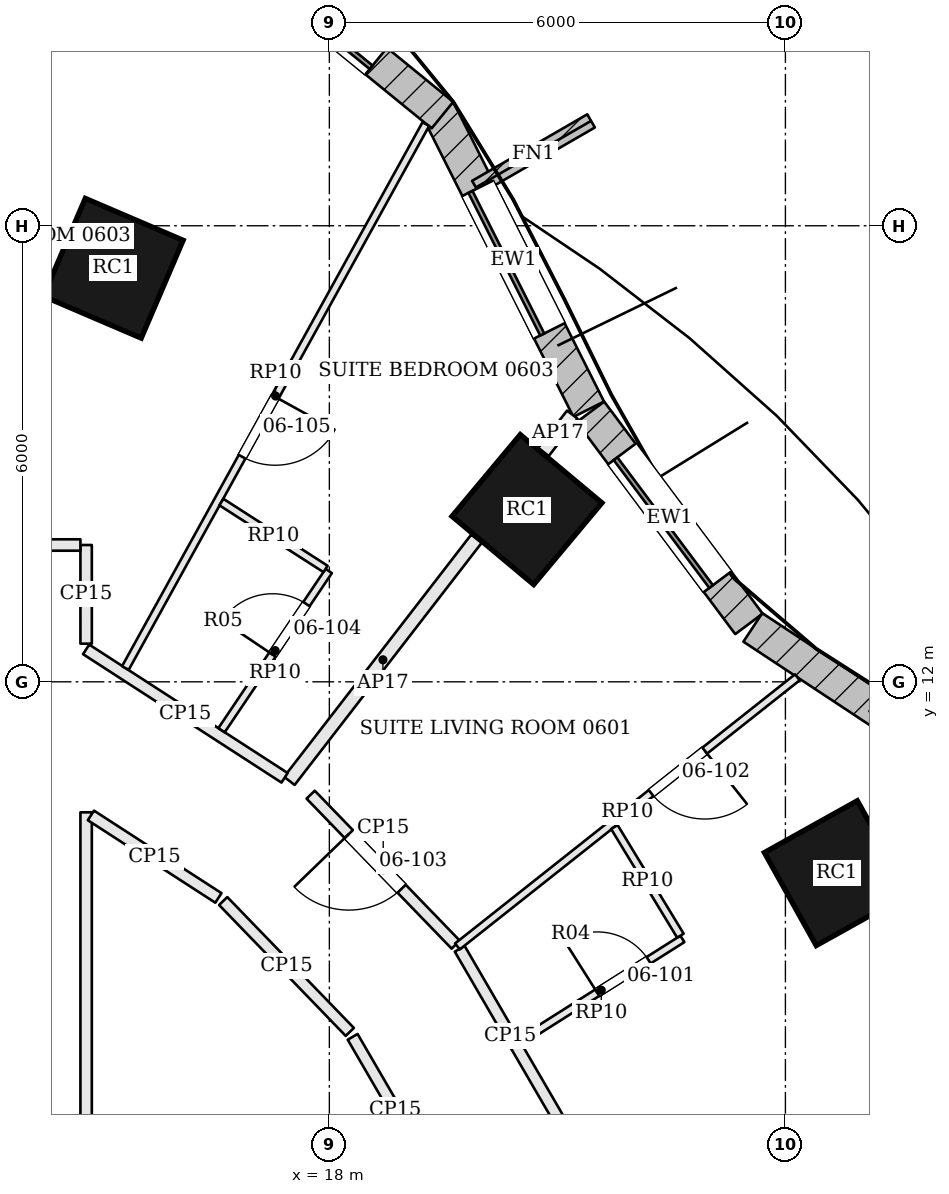
"""IFC4 building model, lengths in metres.
Left out: names, types, materials, properties, quantities, classifications, styles, units other than length and angle.
Written with IfcOpenShell. Run it as: python <this file> out.ifc"""

import sys

from ifc_helpers import new_model, si_unit, direction, frame, frame_2d, origin, origin_2d, place, context, subcontext, project, spatial, rectangle, extrude, element, fill, save


model = new_model("IFC4")
c1 = context("Model", 3, precision=1e-05, world=origin(), true_north=direction((0.0, 1.0)))
c2 = subcontext(c1, "Body", "Model", "MODEL_VIEW")
j1 = project(units=[si_unit("LENGTHUNIT", "METRE"), si_unit("PLANEANGLEUNIT", "RADIAN")], contexts=[c1])
p1 = place(None, origin())
s1 = spatial("IfcSite", under=j1, at=p1, CompositionType="ELEMENT")
p2 = place(p1, origin())
s2 = spatial("IfcBuilding", under=s1, at=p2, CompositionType="ELEMENT")
p3 = place(p2, frame((0.0, 0.0, 37.5)))
s3 = spatial("IfcBuildingStorey", under=s2, at=p3, CompositionType="ELEMENT", Elevation=37.5)
for number, where, z_axis, x_axis in (
    (1, (24.676, 9.483, 0.0), (0.0, 0.0, 1.0), (-0.487, 0.873, 0.0)),
    (2, (20.6, 14.266, 0.0), (0.0, 0.0, 1.0), (-0.767, 0.641, 0.0)),
    (3, (15.157, 17.441, 0.0), (0.0, 0.0, 1.0), (-0.919, 0.394, 0.0)),
):
    element("IfcColumn", number, at=place(p3, frame(where, z_axis=z_axis, x_axis=x_axis)), inside=s3, PredefinedType="COLUMN", context=c2, shape_type="SweptSolid", body=[
        extrude(rectangle(XDim=1.4, YDim=1.4, at=origin_2d()), origin(), (0.0, 0.0, 1.0), 3.6),
    ])
p4 = place(p3, frame((28.853, 9.227, 0.0), z_axis=(0.0, 0.0, 1.0), x_axis=(-0.834404370393, 0.551152743502, 0.0)))
e4 = element("IfcWall", 4, at=p4, inside=s3, PredefinedType="SOLIDWALL", context=c2, shape_type="SweptSolid", body=[
    extrude(rectangle(XDim=6.33, YDim=0.45, at=frame_2d((3.165, 0.0))), origin(), (0.0, 0.0, 1.0), 3.4),
])
p5 = place(p4, frame((2.265, 0.0, 0.9)))
e5 = element("IfcOpeningElement", 5, at=p5, cuts=e4, PredefinedType="OPENING", context=c2, shape_type="SweptSolid", body=[
    extrude(rectangle(XDim=1.8, YDim=2.0, at=frame_2d((0.9, 1.0))), frame((0.0, 0.235, 0.0), z_axis=(0.0, -1.0, 0.0), x_axis=(1.0, 0.0, 0.0)), (0.0, 0.0, 1.0), 0.47),
])
p6 = place(p3, frame((23.52, 12.762, 0.0), z_axis=(0.0, 0.0, 1.0), x_axis=(-0.598664281495, 0.801000048728, 0.0)))
e6 = element("IfcWall", 6, at=p6, inside=s3, PredefinedType="SOLIDWALL", context=c2, shape_type="SweptSolid", body=[
    extrude(rectangle(XDim=3.482, YDim=0.45, at=frame_2d((1.741, 0.0))), origin(), (0.0, 0.0, 1.0), 3.4),
])
p7 = place(p6, frame((0.691, 0.0, 0.9)))
e7 = element("IfcOpeningElement", 7, at=p7, cuts=e6, PredefinedType="OPENING", context=c2, shape_type="SweptSolid", body=[
    extrude(rectangle(XDim=2.1, YDim=2.0, at=frame_2d((1.05, 1.0))), frame((0.0, 0.235, 0.0), z_axis=(0.0, -1.0, 0.0), x_axis=(1.0, 0.0, 0.0)), (0.0, 0.0, 1.0), 0.47),
])
p8 = place(p3, frame((21.413, 15.586, 0.0), z_axis=(0.0, 0.0, 1.0), x_axis=(-0.449428064685, 0.893316525467, 0.0)))
e8 = element("IfcWall", 8, at=p8, inside=s3, PredefinedType="SOLIDWALL", context=c2, shape_type="SweptSolid", body=[
    extrude(rectangle(XDim=4.407, YDim=0.45, at=frame_2d((2.204, 0.0))), origin(), (0.0, 0.0, 1.0), 3.4),
])
p9 = place(p8, frame((1.154, 0.0, 0.9)))
e9 = element("IfcOpeningElement", 9, at=p9, cuts=e8, PredefinedType="OPENING", context=c2, shape_type="SweptSolid", body=[
    extrude(rectangle(XDim=2.1, YDim=2.0, at=frame_2d((1.05, 1.0))), frame((0.0, 0.235, 0.0), z_axis=(0.0, -1.0, 0.0), x_axis=(1.0, 0.0, 0.0)), (0.0, 0.0, 1.0), 0.47),
])
p10 = place(p3, frame((19.488, 19.456, 0.0), z_axis=(0.0, 0.0, 1.0), x_axis=(-0.775096506427, 0.631842864741, 0.0)))
e10 = element("IfcWall", 10, at=p10, inside=s3, PredefinedType="SOLIDWALL", context=c2, shape_type="SweptSolid", body=[
    extrude(rectangle(XDim=4.349, YDim=0.45, at=frame_2d((2.175, 0.0))), origin(), (0.0, 0.0, 1.0), 3.4),
])
p11 = place(p10, frame((1.125, 0.0, 0.9)))
e11 = element("IfcOpeningElement", 11, at=p11, cuts=e10, PredefinedType="OPENING", context=c2, shape_type="SweptSolid", body=[
    extrude(rectangle(XDim=2.1, YDim=2.0, at=frame_2d((1.05, 1.0))), frame((0.0, 0.235, 0.0), z_axis=(0.0, -1.0, 0.0), x_axis=(1.0, 0.0, 0.0)), (0.0, 0.0, 1.0), 0.47),
])
p12 = place(p3, frame((19.928, 18.504, 0.0), z_axis=(0.0, 0.0, 1.0), x_axis=(0.865881186914, 0.500249707794, 0.0)))
e12 = element("IfcWall", 12, at=p12, inside=s3, PredefinedType="SOLIDWALL", context=c2, shape_type="SweptSolid", body=[
    extrude(rectangle(XDim=1.75, YDim=0.2, at=frame_2d((0.875, 0.0))), origin(), (0.0, 0.0, 1.0), 3.4),
])
p13 = place(p3, frame((28.807, 9.347, 3.6), z_axis=(0.0, 0.0, 1.0), x_axis=(-0.834398186729, 0.551162104995, 0.0)))
e13 = element("IfcWall", 13, at=p13, inside=s3, PredefinedType="PARAPET", context=c2, shape_type="SweptSolid", body=[
    extrude(rectangle(XDim=4.337, YDim=0.3, at=frame_2d((2.169, 0.0))), origin(), (0.0, 0.0, 1.0), 1.1),
])
p14 = place(p3, frame((21.043, 6.202, 0.0), z_axis=(0.0, 0.0, 1.0), x_axis=(-0.502371650135, 0.864651794158, 0.0)))
e14 = element("IfcWall", 14, at=p14, inside=s3, PredefinedType="PARTITIONING", context=c2, shape_type="SweptSolid", body=[
    extrude(rectangle(XDim=2.644, YDim=0.15, at=frame_2d((1.322, 0.0))), origin(), (0.0, 0.0, 1.0), 2.68),
])
p15 = place(p3, frame((19.663, 8.542, 0.0), z_axis=(0.0, 0.0, 1.0), x_axis=(-0.695225869021, 0.718791340407, 0.0)))
e15 = element("IfcWall", 15, at=p15, inside=s3, PredefinedType="PARTITIONING", context=c2, shape_type="SweptSolid", body=[
    extrude(rectangle(XDim=2.745, YDim=0.15, at=frame_2d((1.373, 0.0))), origin(), (0.0, 0.0, 1.0), 2.68),
])
p16 = place(p15, frame((1.024, 0.0, 0.0)))
e16 = element("IfcOpeningElement", 16, at=p16, cuts=e15, PredefinedType="OPENING", context=c2, shape_type="SweptSolid", body=[
    extrude(rectangle(XDim=1.0, YDim=2.1, at=frame_2d((0.5, 1.05))), frame((0.0, 0.085, 0.0), z_axis=(0.0, -1.0, 0.0), x_axis=(1.0, 0.0, 0.0)), (0.0, 0.0, 1.0), 0.17),
])
p17 = place(p3, frame((21.197, 15.515, 0.0), z_axis=(0.0, 0.0, 1.0), x_axis=(-0.61138040292, -0.791336845424, 0.0)))
e17 = element("IfcWall", 17, at=p17, inside=s3, PredefinedType="PARTITIONING", context=c2, shape_type="SweptSolid", body=[
    extrude(rectangle(XDim=0.621, YDim=0.175, at=frame_2d((0.311, 0.0))), origin(), (0.0, 0.0, 1.0), 2.68),
])
p18 = place(p3, frame((19.936, 13.883, 0.0), z_axis=(0.0, 0.0, 1.0), x_axis=(-0.611406081733, -0.791317005516, 0.0)))
e18 = element("IfcWall", 18, at=p18, inside=s3, PredefinedType="PARTITIONING", context=c2, shape_type="SweptSolid", body=[
    extrude(rectangle(XDim=4.026, YDim=0.175, at=frame_2d((2.013, 0.0))), origin(), (0.0, 0.0, 1.0), 2.68),
])
p19 = place(p3, frame((17.411, 10.738, 0.0), z_axis=(0.0, 0.0, 1.0), x_axis=(-0.839570157152, 0.543251278157, 0.0)))
e19 = element("IfcWall", 19, at=p19, inside=s3, PredefinedType="PARTITIONING", context=c2, shape_type="SweptSolid", body=[
    extrude(rectangle(XDim=3.109, YDim=0.15, at=frame_2d((1.555, 0.0))), origin(), (0.0, 0.0, 1.0), 2.68),
])
p20 = place(p3, frame((14.8, 12.502, 0.0), z_axis=(0.0, 0.0, 1.0), x_axis=(-0.000188040613, 0.99999998232, 0.0)))
e20 = element("IfcWall", 20, at=p20, inside=s3, PredefinedType="PARTITIONING", context=c2, shape_type="SweptSolid", body=[
    extrude(rectangle(XDim=1.298, YDim=0.15, at=frame_2d((0.649, 0.0))), origin(), (0.0, 0.0, 1.0), 2.68),
])
p21 = place(p3, frame((14.725, 13.8, 0.0), z_axis=(0.0, 0.0, 1.0), x_axis=(-1.0, 0.0, 0.0)))
e21 = element("IfcWall", 21, at=p21, inside=s3, PredefinedType="PARTITIONING", context=c2, shape_type="SweptSolid", body=[
    extrude(rectangle(XDim=3.336, YDim=0.15, at=frame_2d((1.668, 0.0))), origin(), (0.0, 0.0, 1.0), 2.68),
])
p22 = place(p21, frame((2.05, 0.0, 0.0)))
e22 = element("IfcOpeningElement", 22, at=p22, cuts=e21, PredefinedType="OPENING", context=c2, shape_type="SweptSolid", body=[
    extrude(rectangle(XDim=1.0, YDim=2.1, at=frame_2d((0.5, 1.05))), frame((0.0, 0.085, 0.0), z_axis=(0.0, -1.0, 0.0), x_axis=(1.0, 0.0, 0.0)), (0.0, 0.0, 1.0), 0.17),
])
p23 = place(p3, frame((16.604, 9.116, 0.0), z_axis=(0.0, 0.0, 1.0), x_axis=(0.695185405932, -0.718830474716, 0.0)))
e23 = element("IfcWall", 23, at=p23, inside=s3, PredefinedType="PARTITIONING", context=c2, shape_type="SweptSolid", body=[
    extrude(rectangle(XDim=2.396, YDim=0.15, at=frame_2d((1.198, 0.0))), origin(), (0.0, 0.0, 1.0), 2.68),
])
p24 = place(p3, frame((18.306, 7.329, 0.0), z_axis=(0.0, 0.0, 1.0), x_axis=(0.502425081691, -0.864620747662, 0.0)))
e24 = element("IfcWall", 24, at=p24, inside=s3, PredefinedType="PARTITIONING", context=c2, shape_type="SweptSolid", body=[
    extrude(rectangle(XDim=2.237, YDim=0.15, at=frame_2d((1.119, 0.0))), origin(), (0.0, 0.0, 1.0), 2.68),
])
p25 = place(p3, frame((14.8, -4.725, 0.0), z_axis=(0.0, 0.0, 1.0), x_axis=(0.0, 1.0, 0.0)))
e25 = element("IfcWall", 25, at=p25, inside=s3, PredefinedType="PARTITIONING", context=c2, shape_type="SweptSolid", body=[
    extrude(rectangle(XDim=15.008, YDim=0.15, at=frame_2d((7.504, 0.0))), origin(), (0.0, 0.0, 1.0), 2.68),
])
p26 = place(p25, frame((6.566, 0.0, 0.0)))
e26 = element("IfcOpeningElement", 26, at=p26, cuts=e25, PredefinedType="OPENING", context=c2, shape_type="SweptSolid", body=[
    extrude(rectangle(XDim=1.8, YDim=2.1, at=frame_2d((0.9, 1.05))), frame((0.0, 0.085, 0.0), z_axis=(0.0, -1.0, 0.0), x_axis=(1.0, 0.0, 0.0)), (0.0, 0.0, 1.0), 0.17),
])
p27 = place(p3, frame((14.863, 10.242, 0.0), z_axis=(0.0, 0.0, 1.0), x_axis=(0.839530811724, -0.543312079901, 0.0)))
e27 = element("IfcWall", 27, at=p27, inside=s3, PredefinedType="PARTITIONING", context=c2, shape_type="SweptSolid", body=[
    extrude(rectangle(XDim=1.998, YDim=0.15, at=frame_2d((0.999, 0.0))), origin(), (0.0, 0.0, 1.0), 2.68),
])
p28 = place(p3, frame((24.157, 12.06, 0.0), z_axis=(0.0, 0.0, 1.0), x_axis=(-0.784024125513, -0.620730352579, 0.0)))
e28 = element("IfcWall", 28, at=p28, inside=s3, PredefinedType="PARTITIONING", context=c2, shape_type="SweptSolid", body=[
    extrude(rectangle(XDim=5.704, YDim=0.1, at=frame_2d((2.852, 0.0))), origin(), (0.0, 0.0, 1.0), 2.884),
])
p29 = place(p28, frame((1.554, 0.0, 0.0)))
e29 = element("IfcOpeningElement", 29, at=p29, cuts=e28, PredefinedType="OPENING", context=c2, shape_type="SweptSolid", body=[
    extrude(rectangle(XDim=0.9, YDim=2.4, at=frame_2d((0.45, 1.2))), frame((0.0, 0.06, 0.0), z_axis=(0.0, -1.0, 0.0), x_axis=(1.0, 0.0, 0.0)), (0.0, 0.0, 1.0), 0.12),
])
p30 = place(p3, frame((20.51, 7.268, 0.0), z_axis=(0.0, 0.0, 1.0), x_axis=(0.845139460936, 0.534545874148, 0.0)))
e30 = element("IfcWall", 30, at=p30, inside=s3, PredefinedType="PARTITIONING", context=c2, shape_type="SweptSolid", body=[
    extrude(rectangle(XDim=2.525, YDim=0.1, at=frame_2d((1.262, 0.0))), origin(), (0.0, 0.0, 1.0), 2.884),
])
p31 = place(p30, frame((1.2, 0.0, 0.0)))
e31 = element("IfcOpeningElement", 31, at=p31, cuts=e30, PredefinedType="OPENING", context=c2, shape_type="SweptSolid", body=[
    extrude(rectangle(XDim=0.8, YDim=2.1, at=frame_2d((0.4, 1.05))), frame((0.0, 0.06, 0.0), z_axis=(0.0, -1.0, 0.0), x_axis=(1.0, 0.0, 0.0)), (0.0, 0.0, 1.0), 0.12),
])
p32 = place(p3, frame((22.618, 8.661, 0.0), z_axis=(0.0, 0.0, 1.0), x_axis=(-0.519423656264, 0.854516860754, 0.0)))
e32 = element("IfcWall", 32, at=p32, inside=s3, PredefinedType="PARTITIONING", context=c2, shape_type="SweptSolid", body=[
    extrude(rectangle(XDim=1.673, YDim=0.1, at=frame_2d((0.836, 0.0))), origin(), (0.0, 0.0, 1.0), 2.884),
])
p33 = place(p3, frame((19.269, 19.337, 0.0), z_axis=(0.0, 0.0, 1.0), x_axis=(-0.483536788566, -0.875324039487, 0.0)))
e33 = element("IfcWall", 33, at=p33, inside=s3, PredefinedType="PARTITIONING", context=c2, shape_type="SweptSolid", body=[
    extrude(rectangle(XDim=8.174, YDim=0.1, at=frame_2d((4.087, 0.0))), origin(), (0.0, 0.0, 1.0), 2.884),
])
p34 = place(p33, frame((4.099, 0.0, 0.0)))
e34 = element("IfcOpeningElement", 34, at=p34, cuts=e33, PredefinedType="OPENING", context=c2, shape_type="SweptSolid", body=[
    extrude(rectangle(XDim=0.9, YDim=2.4, at=frame_2d((0.45, 1.2))), frame((0.0, 0.06, 0.0), z_axis=(0.0, -1.0, 0.0), x_axis=(1.0, 0.0, 0.0)), (0.0, 0.0, 1.0), 0.12),
])
p35 = place(p3, frame((16.582, 11.364, 0.0), z_axis=(0.0, 0.0, 1.0), x_axis=(0.558554224274, 0.829468009356, 0.0)))
e35 = element("IfcWall", 35, at=p35, inside=s3, PredefinedType="PARTITIONING", context=c2, shape_type="SweptSolid", body=[
    extrude(rectangle(XDim=2.525, YDim=0.1, at=frame_2d((1.263, 0.0))), origin(), (0.0, 0.0, 1.0), 2.884),
])
p36 = place(p35, frame((1.2, 0.0, 0.0)))
e36 = element("IfcOpeningElement", 36, at=p36, cuts=e35, PredefinedType="OPENING", context=c2, shape_type="SweptSolid", body=[
    extrude(rectangle(XDim=0.8, YDim=2.1, at=frame_2d((0.4, 1.05))), frame((0.0, 0.06, 0.0), z_axis=(0.0, -1.0, 0.0), x_axis=(1.0, 0.0, 0.0)), (0.0, 0.0, 1.0), 0.12),
])
p37 = place(p3, frame((17.95, 13.485, 0.0), z_axis=(0.0, 0.0, 1.0), x_axis=(-0.841431701804, 0.540363480631, 0.0)))
e37 = element("IfcWall", 37, at=p37, inside=s3, PredefinedType="PARTITIONING", context=c2, shape_type="SweptSolid", body=[
    extrude(rectangle(XDim=1.628, YDim=0.1, at=frame_2d((0.814, 0.0))), origin(), (0.0, 0.0, 1.0), 2.884),
])
p38 = place(p7, origin())
e38 = element("IfcWindow", 38, at=p38, inside=s3, PartitioningType="SINGLE_PANEL", PredefinedType="WINDOW", context=c2, shape_type="SweptSolid", body=[
    extrude(rectangle(XDim=2.1, YDim=2.0, at=frame_2d((1.05, 1.0))), frame((0.0, 0.135, 0.0), z_axis=(0.0, -1.0, 0.0), x_axis=(1.0, 0.0, 0.0)), (0.0, 0.0, 1.0), 0.06),
])
fill(e7, e38)
p39 = place(p9, origin())
e39 = element("IfcWindow", 39, at=p39, inside=s3, PartitioningType="SINGLE_PANEL", PredefinedType="WINDOW", context=c2, shape_type="SweptSolid", body=[
    extrude(rectangle(XDim=2.1, YDim=2.0, at=frame_2d((1.05, 1.0))), frame((0.0, 0.135, 0.0), z_axis=(0.0, -1.0, 0.0), x_axis=(1.0, 0.0, 0.0)), (0.0, 0.0, 1.0), 0.06),
])
fill(e9, e39)
p40 = place(p11, origin())
e40 = element("IfcWindow", 40, at=p40, inside=s3, PartitioningType="SINGLE_PANEL", PredefinedType="WINDOW", context=c2, shape_type="SweptSolid", body=[
    extrude(rectangle(XDim=2.1, YDim=2.0, at=frame_2d((1.05, 1.0))), frame((0.0, 0.135, 0.0), z_axis=(0.0, -1.0, 0.0), x_axis=(1.0, 0.0, 0.0)), (0.0, 0.0, 1.0), 0.06),
])
fill(e11, e40)
p41 = place(p31, origin())
e41 = element("IfcDoor", 41, at=p41, inside=s3, OperationType="SINGLE_SWING_LEFT", PredefinedType="DOOR", context=c2, shape_type="SweptSolid", body=[
    extrude(rectangle(XDim=0.8, YDim=2.1, at=frame_2d((0.4, 1.05))), frame((0.0, 0.025, 0.0), z_axis=(0.0, -1.0, 0.0), x_axis=(1.0, 0.0, 0.0)), (0.0, 0.0, 1.0), 0.05),
])
fill(e31, e41)
p42 = place(p29, origin())
e42 = element("IfcDoor", 42, at=p42, inside=s3, OperationType="SINGLE_SWING_LEFT", PredefinedType="DOOR", context=c2, shape_type="SweptSolid", body=[
    extrude(rectangle(XDim=0.9, YDim=2.4, at=frame_2d((0.45, 1.2))), frame((0.0, 0.025, 0.0), z_axis=(0.0, -1.0, 0.0), x_axis=(1.0, 0.0, 0.0)), (0.0, 0.0, 1.0), 0.05),
])
fill(e29, e42)
p43 = place(p16, origin())
e43 = element("IfcDoor", 43, at=p43, inside=s3, OperationType="SINGLE_SWING_RIGHT", PredefinedType="DOOR", context=c2, shape_type="SweptSolid", body=[
    extrude(rectangle(XDim=1.0, YDim=2.1, at=frame_2d((0.5, 1.05))), frame((0.0, 0.025, 0.0), z_axis=(0.0, -1.0, 0.0), x_axis=(1.0, 0.0, 0.0)), (0.0, 0.0, 1.0), 0.05),
])
fill(e16, e43)
p44 = place(p36, origin())
e44 = element("IfcDoor", 44, at=p44, inside=s3, OperationType="SINGLE_SWING_LEFT", PredefinedType="DOOR", context=c2, shape_type="SweptSolid", body=[
    extrude(rectangle(XDim=0.8, YDim=2.1, at=frame_2d((0.4, 1.05))), frame((0.0, 0.025, 0.0), z_axis=(0.0, -1.0, 0.0), x_axis=(1.0, 0.0, 0.0)), (0.0, 0.0, 1.0), 0.05),
])
fill(e36, e44)
p45 = place(p34, origin())
e45 = element("IfcDoor", 45, at=p45, inside=s3, OperationType="SINGLE_SWING_LEFT", PredefinedType="DOOR", context=c2, shape_type="SweptSolid", body=[
    extrude(rectangle(XDim=0.9, YDim=2.4, at=frame_2d((0.45, 1.2))), frame((0.0, 0.025, 0.0), z_axis=(0.0, -1.0, 0.0), x_axis=(1.0, 0.0, 0.0)), (0.0, 0.0, 1.0), 0.05),
])
fill(e34, e45)
save(model, sys.argv[1])
